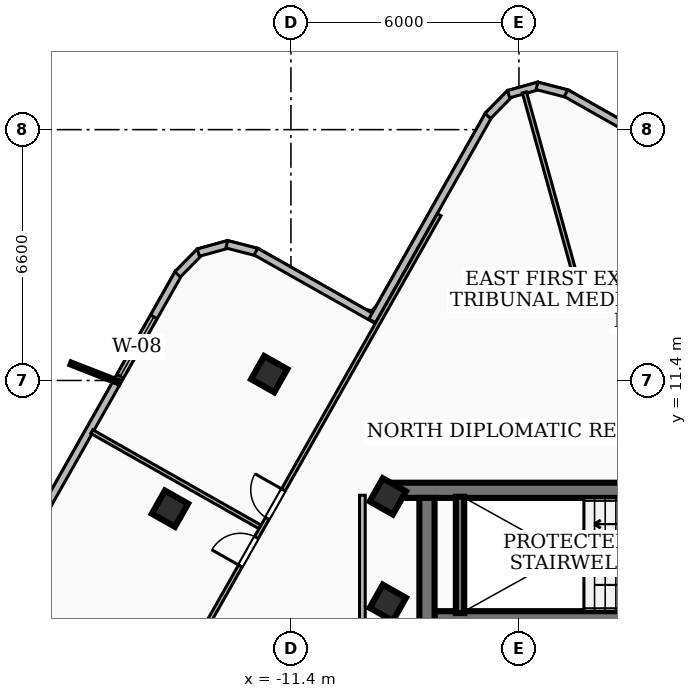
"""IFC4 building model, lengths in metres.
Left out: names, types, materials, properties, quantities, classifications, styles, units other than length and angle.
Written with IfcOpenShell. Run it as: python <this file> out.ifc"""

import sys

from ifc_helpers import new_model, si_unit, direction, frame, frame_2d, origin, origin_2d, place, context, subcontext, project, spatial, rectangle, extrude, element, fill, save


model = new_model("IFC4")
c1 = context("Model", 3, precision=1e-05, world=origin(), true_north=direction((0.0, 1.0)))
c2 = subcontext(c1, "Body", "Model", "MODEL_VIEW")
j1 = project(units=[si_unit("LENGTHUNIT", "METRE"), si_unit("PLANEANGLEUNIT", "RADIAN")], contexts=[c1])
p1 = place(None, origin())
s1 = spatial("IfcSite", under=j1, at=p1, CompositionType="ELEMENT")
p2 = place(p1, origin())
s2 = spatial("IfcBuilding", under=s1, at=p2, CompositionType="ELEMENT")
p3 = place(p2, frame((0.0, 0.0, 278.28)))
s3 = spatial("IfcBuildingStorey", under=s2, at=p3, CompositionType="ELEMENT", Elevation=278.28)
p4 = place(p3, frame((-8.78, 8.51, 0.0), z_axis=(0.0, 0.0, 1.0), x_axis=(1.0, 0.0, 0.0)))
e1 = element("IfcWall", 1, at=p4, inside=s3, PredefinedType="SHEAR", context=c2, shape_type="SweptSolid", body=[
    extrude(rectangle(XDim=17.56, YDim=0.4, at=frame_2d((8.78, 0.0))), origin(), (0.0, 0.0, 1.0), 3.16),
])
p5 = place(p3, frame((-7.82, 1.95, 0.0), z_axis=(0.0, 0.0, 1.0), x_axis=(0.0, 1.0, 0.0)))
e2 = element("IfcWall", 2, at=p5, inside=s3, PredefinedType="SHEAR", context=c2, shape_type="SweptSolid", body=[
    extrude(rectangle(XDim=6.36, YDim=0.4, at=frame_2d((3.18, 0.0))), origin(), (0.0, 0.0, 1.0), 3.16),
])
p6 = place(p3, frame((7.62, 5.18, 0.0), z_axis=(0.0, 0.0, 1.0), x_axis=(-1.0, 0.0, 0.0)))
e3 = element("IfcWall", 3, at=p6, inside=s3, PredefinedType="SOLIDWALL", context=c2, shape_type="SweptSolid", body=[
    extrude(rectangle(XDim=15.24, YDim=0.3, at=frame_2d((7.62, 0.0))), origin(), (0.0, 0.0, 1.0), 3.16),
])
p7 = place(p6, frame((5.77, 0.0, 0.0)))
e4 = element("IfcOpeningElement", 4, at=p7, cuts=e3, PredefinedType="OPENING", context=c2, shape_type="SweptSolid", body=[
    extrude(rectangle(XDim=1.1, YDim=2.15, at=frame_2d((0.55, 1.075))), frame((0.0, 0.16, 0.0), z_axis=(0.0, -1.0, 0.0), x_axis=(1.0, 0.0, 0.0)), (0.0, 0.0, 1.0), 0.32),
])
p8 = place(p6, frame((2.97, 0.0, 0.0)))
e5 = element("IfcOpeningElement", 5, at=p8, cuts=e3, PredefinedType="OPENING", context=c2, shape_type="SweptSolid", body=[
    extrude(rectangle(XDim=1.1, YDim=2.15, at=frame_2d((0.55, 1.075))), frame((0.0, 0.16, 0.0), z_axis=(0.0, -1.0, 0.0), x_axis=(1.0, 0.0, 0.0)), (0.0, 0.0, 1.0), 0.32),
])
p9 = place(p6, frame((7.97, 0.0, 0.0)))
e6 = element("IfcOpeningElement", 6, at=p9, cuts=e3, PredefinedType="OPENING", context=c2, shape_type="SweptSolid", body=[
    extrude(rectangle(XDim=1.0, YDim=2.1, at=frame_2d((0.5, 1.05))), frame((0.0, 0.16, 0.0), z_axis=(0.0, -1.0, 0.0), x_axis=(1.0, 0.0, 0.0)), (0.0, 0.0, 1.0), 0.32),
])
p10 = place(p3, frame((-6.95, 5.28, 0.0), z_axis=(0.0, 0.0, 1.0), x_axis=(0.0, 1.0, 0.0)))
e7 = element("IfcWall", 7, at=p10, inside=s3, PredefinedType="SOLIDWALL", context=c2, shape_type="SweptSolid", body=[
    extrude(rectangle(XDim=3.06, YDim=0.22, at=frame_2d((1.53, 0.0))), origin(), (0.0, 0.0, 1.0), 3.16),
])
for number, where, z_axis, x_axis in (
    (8, (-8.85, 5.55, 0.0), (0.0, 0.0, 1.0), (0.493, 0.87, 0.0)),
    (9, (-8.85, 8.35, 0.0), (0.0, 0.0, 1.0), (0.493, 0.87, 0.0)),
    (10, (-11.971, 11.566, 0.0), (0.0, 0.0, 1.0), (0.493, 0.87, 0.0)),
    (11, (-14.583, 8.026, 0.0), (0.0, 0.0, 1.0), (0.493, 0.87, 0.0)),
):
    element("IfcColumn", number, at=place(p3, frame(where, z_axis=z_axis, x_axis=x_axis)), inside=s3, PredefinedType="COLUMN", context=c2, shape_type="SweptSolid", body=[
        extrude(rectangle(XDim=0.7, YDim=0.7, at=origin_2d()), origin(), (0.0, 0.0, 1.0), 3.42),
    ])
p11 = place(p3, frame((-19.339, 5.421, 0.0), z_axis=(0.0, 0.0, 1.0), x_axis=(0.492615794655, 0.870246906835, 0.0)))
e12 = element("IfcWall", 12, at=p11, inside=s3, PredefinedType="SOLIDWALL", context=c2, shape_type="SweptSolid", body=[
    extrude(rectangle(XDim=10.124, YDim=0.2, at=frame_2d((5.062, 0.0))), origin(), (0.0, 0.0, 1.0), 3.16),
])
p12 = place(p11, frame((6.996, 0.0, 0.85)))
e13 = element("IfcOpeningElement", 13, at=p12, cuts=e12, PredefinedType="OPENING", context=c2, shape_type="SweptSolid", body=[
    extrude(rectangle(XDim=1.8, YDim=1.8, at=frame_2d((0.9, 0.9))), frame((0.0, 0.11, 0.0), z_axis=(0.0, -1.0, 0.0), x_axis=(1.0, 0.0, 0.0)), (0.0, 0.0, 1.0), 0.22),
])
p13 = place(p3, frame((-14.382, 14.191, 0.0), z_axis=(0.0, 0.0, 1.0), x_axis=(0.701706468749, 0.712466161804, 0.0)))
e14 = element("IfcWall", 14, at=p13, inside=s3, PredefinedType="SOLIDWALL", context=c2, shape_type="SweptSolid", body=[
    extrude(rectangle(XDim=0.84, YDim=0.2, at=frame_2d((0.42, 0.0))), origin(), (0.0, 0.0, 1.0), 3.16),
])
p14 = place(p3, frame((-13.835, 14.764, 0.0), z_axis=(0.0, 0.0, 1.0), x_axis=(0.963780368541, 0.266697208862, 0.0)))
e15 = element("IfcWall", 15, at=p14, inside=s3, PredefinedType="SOLIDWALL", context=c2, shape_type="SweptSolid", body=[
    extrude(rectangle(XDim=0.825, YDim=0.2, at=frame_2d((0.412, 0.0))), origin(), (0.0, 0.0, 1.0), 3.16),
])
p15 = place(p3, frame((-13.088, 14.983, 0.0), z_axis=(0.0, 0.0, 1.0), x_axis=(0.968350107443, -0.249595812096, 0.0)))
e16 = element("IfcWall", 16, at=p15, inside=s3, PredefinedType="SOLIDWALL", context=c2, shape_type="SweptSolid", body=[
    extrude(rectangle(XDim=0.837, YDim=0.2, at=frame_2d((0.419, 0.0))), origin(), (0.0, 0.0, 1.0), 3.16),
])
p16 = place(p3, frame((-12.323, 14.792, 0.0), z_axis=(0.0, 0.0, 1.0), x_axis=(0.870412972764, -0.492322309918, 0.0)))
e17 = element("IfcWall", 17, at=p16, inside=s3, PredefinedType="SOLIDWALL", context=c2, shape_type="SweptSolid", body=[
    extrude(rectangle(XDim=3.642, YDim=0.2, at=frame_2d((1.821, 0.0))), origin(), (0.0, 0.0, 1.0), 3.16),
])
p17 = place(p3, frame((-9.262, 12.968, 0.0), z_axis=(0.0, 0.0, 1.0), x_axis=(0.492583125855, 0.87026539867, 0.0)))
e18 = element("IfcWall", 18, at=p17, inside=s3, PredefinedType="SOLIDWALL", context=c2, shape_type="SweptSolid", body=[
    extrude(rectangle(XDim=6.24, YDim=0.2, at=frame_2d((3.12, 0.0))), origin(), (0.0, 0.0, 1.0), 3.16),
])
p18 = place(p3, frame((-6.218, 18.359, 0.0), z_axis=(0.0, 0.0, 1.0), x_axis=(0.701706468749, 0.712466161804, 0.0)))
e19 = element("IfcWall", 19, at=p18, inside=s3, PredefinedType="SOLIDWALL", context=c2, shape_type="SweptSolid", body=[
    extrude(rectangle(XDim=0.84, YDim=0.2, at=frame_2d((0.42, 0.0))), origin(), (0.0, 0.0, 1.0), 3.16),
])
p19 = place(p3, frame((-5.671, 18.932, 0.0), z_axis=(0.0, 0.0, 1.0), x_axis=(0.963313924885, 0.268377126675, 0.0)))
e20 = element("IfcWall", 20, at=p19, inside=s3, PredefinedType="SOLIDWALL", context=c2, shape_type="SweptSolid", body=[
    extrude(rectangle(XDim=0.824, YDim=0.2, at=frame_2d((0.412, 0.0))), origin(), (0.0, 0.0, 1.0), 3.16),
])
p20 = place(p3, frame((-4.925, 19.152, 0.0), z_axis=(0.0, 0.0, 1.0), x_axis=(0.968015248239, -0.250891369276, 0.0)))
e21 = element("IfcWall", 21, at=p20, inside=s3, PredefinedType="SOLIDWALL", context=c2, shape_type="SweptSolid", body=[
    extrude(rectangle(XDim=0.838, YDim=0.2, at=frame_2d((0.419, 0.0))), origin(), (0.0, 0.0, 1.0), 3.16),
])
p21 = place(p3, frame((-4.16, 18.96, 0.0), z_axis=(0.0, 0.0, 1.0), x_axis=(0.870345588147, -0.492441425139, 0.0)))
e22 = element("IfcWall", 22, at=p21, inside=s3, PredefinedType="SOLIDWALL", context=c2, shape_type="SweptSolid", body=[
    extrude(rectangle(XDim=6.742, YDim=0.2, at=frame_2d((3.371, 0.0))), origin(), (0.0, 0.0, 1.0), 3.16),
])
p22 = place(p3, frame((-9.52, 1.75, 0.0), z_axis=(0.0, 0.0, 1.0), x_axis=(0.0, 1.0, 0.0)))
e23 = element("IfcWall", 23, at=p22, inside=s3, PredefinedType="PARTITIONING", context=c2, shape_type="SweptSolid", body=[
    extrude(rectangle(XDim=6.63, YDim=0.15, at=frame_2d((3.315, 0.0))), origin(), (0.0, 0.0, 1.0), 2.53),
])
p23 = place(p3, frame((-3.75, 13.54, 0.0), z_axis=(0.0, 0.0, 1.0), x_axis=(-0.266822842302, 0.963745594452, 0.0)))
e24 = element("IfcWall", 24, at=p23, inside=s3, PredefinedType="PARTITIONING", context=c2, shape_type="SweptSolid", body=[
    extrude(rectangle(XDim=5.645, YDim=0.11, at=frame_2d((2.822, 0.0))), origin(), (0.0, 0.0, 1.0), 3.16),
])
p24 = place(p3, frame((-12.216, 7.549, 0.0), z_axis=(0.0, 0.0, 1.0), x_axis=(-0.870245204201, 0.492618802488, 0.0)))
e25 = element("IfcWall", 25, at=p24, inside=s3, PredefinedType="PARTITIONING", context=c2, shape_type="SweptSolid", body=[
    extrude(rectangle(XDim=5.085, YDim=0.11, at=frame_2d((2.542, 0.0))), origin(), (0.0, 0.0, 1.0), 2.53),
])
p25 = place(p3, frame((-17.619, -2.113, 0.0), z_axis=(0.0, 0.0, 1.0), x_axis=(0.492746831558, 0.870172718482, 0.0)))
e26 = element("IfcWall", 26, at=p25, inside=s3, PredefinedType="PARTITIONING", context=c2, shape_type="SweptSolid", body=[
    extrude(rectangle(XDim=20.54, YDim=0.11, at=frame_2d((10.27, 0.0))), origin(), (0.0, 0.0, 1.0), 2.53),
])
p26 = place(p25, frame((11.36, 0.0, 0.0)))
e27 = element("IfcOpeningElement", 27, at=p26, cuts=e26, PredefinedType="OPENING", context=c2, shape_type="SweptSolid", body=[
    extrude(rectangle(XDim=0.86, YDim=2.04, at=frame_2d((0.43, 1.02))), frame((0.0, 0.065, 0.0), z_axis=(0.0, -1.0, 0.0), x_axis=(1.0, 0.0, 0.0)), (0.0, 0.0, 1.0), 0.13),
])
p27 = place(p25, frame((9.92, 0.0, 0.0)))
e28 = element("IfcOpeningElement", 28, at=p27, cuts=e26, PredefinedType="OPENING", context=c2, shape_type="SweptSolid", body=[
    extrude(rectangle(XDim=0.86, YDim=2.04, at=frame_2d((0.43, 1.02))), frame((0.0, 0.065, 0.0), z_axis=(0.0, -1.0, 0.0), x_axis=(1.0, 0.0, 0.0)), (0.0, 0.0, 1.0), 0.13),
])
p28 = place(p12, origin())
e29 = element("IfcWindow", 29, at=p28, inside=s3, PartitioningType="SINGLE_PANEL", PredefinedType="WINDOW", context=c2, shape_type="SweptSolid", body=[
    extrude(rectangle(XDim=1.8, YDim=1.8, at=frame_2d((0.9, 0.9))), frame((0.0, 0.03, 0.0), z_axis=(0.0, -1.0, 0.0), x_axis=(1.0, 0.0, 0.0)), (0.0, 0.0, 1.0), 0.06),
])
fill(e13, e29)
p29 = place(p26, origin())
e30 = element("IfcDoor", 30, at=p29, inside=s3, OperationType="SINGLE_SWING_RIGHT", PredefinedType="DOOR", context=c2, shape_type="SweptSolid", body=[
    extrude(rectangle(XDim=0.86, YDim=2.04, at=frame_2d((0.43, 1.02))), frame((0.0, 0.025, 0.0), z_axis=(0.0, -1.0, 0.0), x_axis=(1.0, 0.0, 0.0)), (0.0, 0.0, 1.0), 0.05),
])
fill(e27, e30)
p30 = place(p27, origin())
e31 = element("IfcDoor", 31, at=p30, inside=s3, OperationType="SINGLE_SWING_LEFT", PredefinedType="DOOR", context=c2, shape_type="SweptSolid", body=[
    extrude(rectangle(XDim=0.86, YDim=2.04, at=frame_2d((0.43, 1.02))), frame((0.0, 0.025, 0.0), z_axis=(0.0, -1.0, 0.0), x_axis=(1.0, 0.0, 0.0)), (0.0, 0.0, 1.0), 0.05),
])
fill(e28, e31)
save(model, sys.argv[1])
